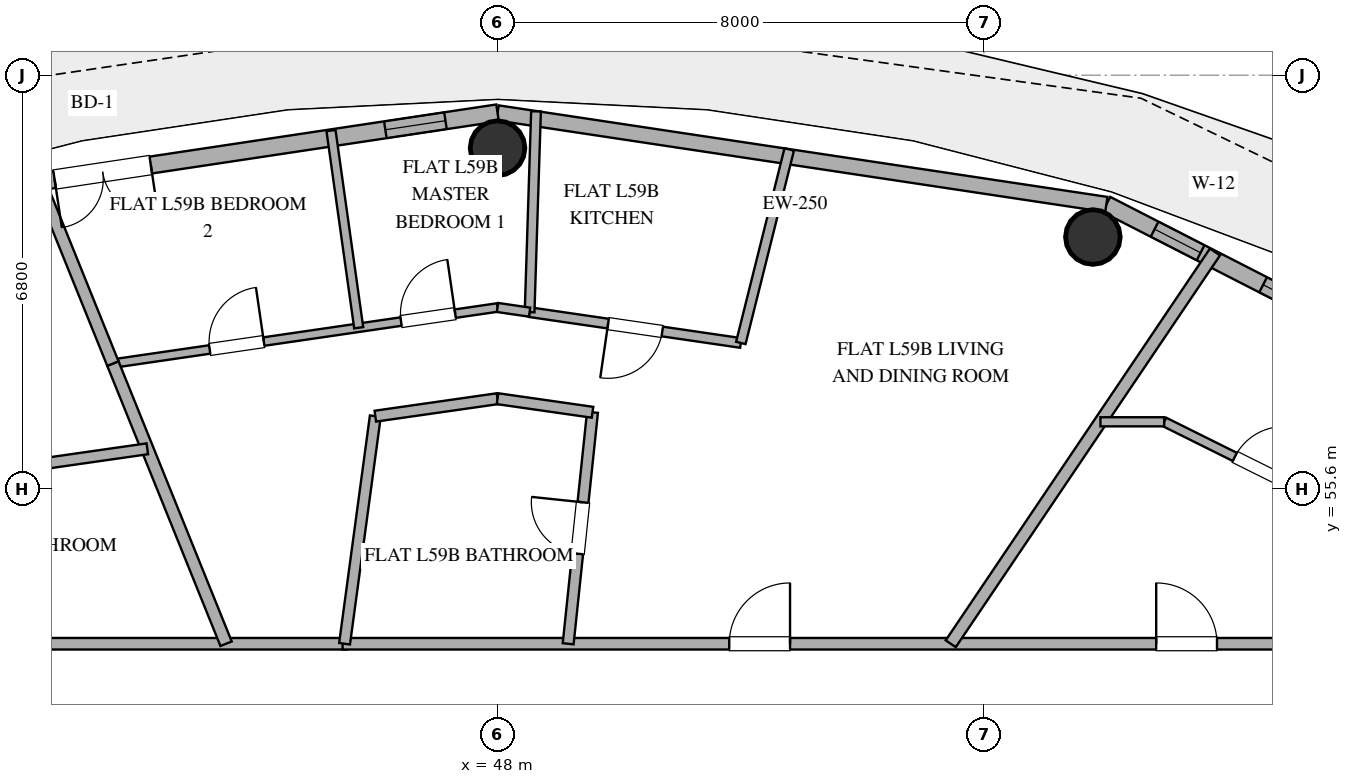
"""IFC4 building model, lengths in metres.
Left out: names, types, materials, properties, quantities, classifications, styles, units other than length and angle.
Written with IfcOpenShell. Run it as: python <this file> out.ifc"""

import sys

from ifc_helpers import new_model, si_unit, direction, frame, frame_2d, origin, origin_2d, place, context, subcontext, project, spatial, rectangle, hollow_circle, extrude, element, fill, save


model = new_model("IFC4")
c1 = context("Model", 3, precision=1e-05, world=origin(), true_north=direction((0.0, 1.0)))
c2 = subcontext(c1, "Body", "Model", "MODEL_VIEW")
j1 = project(units=[si_unit("LENGTHUNIT", "METRE"), si_unit("PLANEANGLEUNIT", "RADIAN")], contexts=[c1])
p1 = place(None, origin())
s1 = spatial("IfcSite", under=j1, at=p1, CompositionType="ELEMENT")
p2 = place(p1, origin())
s2 = spatial("IfcBuilding", under=s1, at=p2, CompositionType="ELEMENT")
p3 = place(p2, frame((0.0, 0.0, 231.6)))
s3 = spatial("IfcBuildingStorey", under=s2, at=p3, CompositionType="ELEMENT", Elevation=231.6)
for number, where, z_axis, x_axis in (
    (1, (57.791, 59.739, 0.0), (0.0, 0.0, 1.0), (1.0, 0.0, 0.0)),
    (2, (48.0, 61.2, 0.0), (0.0, 0.0, 1.0), (1.0, 0.0, 0.0)),
):
    element("IfcColumn", number, at=place(p3, frame(where, z_axis=z_axis, x_axis=x_axis)), inside=s3, PredefinedType="COLUMN", context=c2, shape_type="SweptSolid", body=[
        extrude(hollow_circle(Radius=0.45, WallThickness=0.025, at=origin_2d()), origin(), (0.0, 0.0, 1.0), 3.36),
    ])
p4 = place(p3, frame((66.383, 55.987, 0.0), z_axis=(0.0, 0.0, 1.0), x_axis=(-0.890007394051, 0.455946091699, 0.0)))
e3 = element("IfcWall", 3, at=p4, inside=s3, PredefinedType="SOLIDWALL", context=c2, shape_type="SweptSolid", body=[
    extrude(rectangle(XDim=9.404, YDim=0.28, at=frame_2d((4.702, 0.0))), origin(), (0.0, 0.0, 1.0), 3.36),
])
p5 = place(p4, frame((3.406, 0.0, 0.85)))
e4 = element("IfcOpeningElement", 4, at=p5, cuts=e3, PredefinedType="OPENING", context=c2, shape_type="SweptSolid", body=[
    extrude(rectangle(XDim=1.2, YDim=1.8, at=frame_2d((0.6, 0.9))), frame((0.0, 0.15, 0.0), z_axis=(0.0, -1.0, 0.0), x_axis=(1.0, 0.0, 0.0)), (0.0, 0.0, 1.0), 0.3),
])
p6 = place(p4, frame((5.307, 0.0, 0.85)))
e5 = element("IfcOpeningElement", 5, at=p6, cuts=e3, PredefinedType="OPENING", context=c2, shape_type="SweptSolid", body=[
    extrude(rectangle(XDim=1.2, YDim=1.8, at=frame_2d((0.6, 0.9))), frame((0.0, 0.15, 0.0), z_axis=(0.0, -1.0, 0.0), x_axis=(1.0, 0.0, 0.0)), (0.0, 0.0, 1.0), 0.3),
])
p7 = place(p4, frame((7.663, 0.0, 0.85)))
e6 = element("IfcOpeningElement", 6, at=p7, cuts=e3, PredefinedType="OPENING", context=c2, shape_type="SweptSolid", body=[
    extrude(rectangle(XDim=0.85, YDim=1.8, at=frame_2d((0.425, 0.9))), frame((0.0, 0.15, 0.0), z_axis=(0.0, -1.0, 0.0), x_axis=(1.0, 0.0, 0.0)), (0.0, 0.0, 1.0), 0.3),
])
p8 = place(p3, frame((58.013, 60.274, 0.0), z_axis=(0.0, 0.0, 1.0), x_axis=(-0.988882522213, 0.148698881169, 0.0)))
e7 = element("IfcWall", 7, at=p8, inside=s3, PredefinedType="SOLIDWALL", context=c2, shape_type="SweptSolid", body=[
    extrude(rectangle(XDim=10.125, YDim=0.25, at=frame_2d((5.062, 0.0))), origin(), (0.0, 0.0, 1.0), 3.36),
])
p9 = place(p3, frame((48.0, 61.78, 0.0), z_axis=(0.0, 0.0, 1.0), x_axis=(-0.988882522213, -0.148698881169, 0.0)))
e8 = element("IfcWall", 8, at=p9, inside=s3, PredefinedType="SOLIDWALL", context=c2, shape_type="SweptSolid", body=[
    extrude(rectangle(XDim=10.125, YDim=0.28, at=frame_2d((5.062, 0.0))), origin(), (0.0, 0.0, 1.0), 3.36),
])
p10 = place(p9, frame((5.767, 0.0, 0.0)))
e9 = element("IfcOpeningElement", 9, at=p10, cuts=e8, PredefinedType="OPENING", context=c2, shape_type="SweptSolid", body=[
    extrude(rectangle(XDim=1.6, YDim=2.25, at=frame_2d((0.8, 1.125))), frame((0.0, 0.15, 0.0), z_axis=(0.0, -1.0, 0.0), x_axis=(1.0, 0.0, 0.0)), (0.0, 0.0, 1.0), 0.3),
])
p11 = place(p9, frame((0.866, 0.0, 0.85)))
e10 = element("IfcOpeningElement", 10, at=p11, cuts=e8, PredefinedType="OPENING", context=c2, shape_type="SweptSolid", body=[
    extrude(rectangle(XDim=1.0, YDim=1.8, at=frame_2d((0.5, 0.9))), frame((0.0, 0.15, 0.0), z_axis=(0.0, -1.0, 0.0), x_axis=(1.0, 0.0, 0.0)), (0.0, 0.0, 1.0), 0.3),
])
p12 = place(p3, frame((32.75, 53.05, 0.0), z_axis=(0.0, 0.0, 1.0), x_axis=(1.0, 0.0, 0.0)))
e11 = element("IfcWall", 11, at=p12, inside=s3, PredefinedType="PARTITIONING", context=c2, shape_type="SweptSolid", body=[
    extrude(rectangle(XDim=12.766, YDim=0.19, at=frame_2d((6.383, 0.0))), origin(), (0.0, 0.0, 1.0), 2.72),
])
p13 = place(p3, frame((45.452, 53.05, 0.0), z_axis=(0.0, 0.0, 1.0), x_axis=(1.0, 0.0, 0.0)))
e12 = element("IfcWall", 12, at=p13, inside=s3, PredefinedType="PARTITIONING", context=c2, shape_type="SweptSolid", body=[
    extrude(rectangle(XDim=17.798, YDim=0.19, at=frame_2d((8.899, 0.0))), origin(), (0.0, 0.0, 1.0), 2.72),
])
p14 = place(p13, frame((13.381, 0.0, 0.0)))
e13 = element("IfcOpeningElement", 13, at=p14, cuts=e12, PredefinedType="OPENING", context=c2, shape_type="SweptSolid", body=[
    extrude(rectangle(XDim=1.0, YDim=2.2, at=frame_2d((0.5, 1.1))), frame((0.0, 0.105, 0.0), z_axis=(0.0, -1.0, 0.0), x_axis=(1.0, 0.0, 0.0)), (0.0, 0.0, 1.0), 0.21),
])
p15 = place(p13, frame((6.359, 0.0, 0.0)))
e14 = element("IfcOpeningElement", 14, at=p15, cuts=e12, PredefinedType="OPENING", context=c2, shape_type="SweptSolid", body=[
    extrude(rectangle(XDim=1.0, YDim=2.2, at=frame_2d((0.5, 1.1))), frame((0.0, 0.105, 0.0), z_axis=(0.0, -1.0, 0.0), x_axis=(1.0, 0.0, 0.0)), (0.0, 0.0, 1.0), 0.21),
])
p16 = place(p3, frame((59.799, 59.493, 0.0), z_axis=(0.0, 0.0, 1.0), x_axis=(-0.559208454265, -0.8290270832, 0.0)))
e15 = element("IfcWall", 15, at=p16, inside=s3, PredefinedType="PARTITIONING", context=c2, shape_type="SweptSolid", body=[
    extrude(rectangle(XDim=7.771, YDim=0.2, at=frame_2d((3.886, 0.0))), origin(), (0.0, 0.0, 1.0), 2.72),
])
p17 = place(p3, frame((41.674, 57.657, 0.0), z_axis=(0.0, 0.0, 1.0), x_axis=(0.989537524877, 0.144275732054, 0.0)))
e16 = element("IfcWall", 16, at=p17, inside=s3, PredefinedType="PARTITIONING", context=c2, shape_type="SweptSolid", body=[
    extrude(rectangle(XDim=6.393, YDim=0.14, at=frame_2d((3.197, 0.0))), origin(), (0.0, 0.0, 1.0), 2.72),
])
p18 = place(p17, frame((1.609, 0.0, 0.0)))
e17 = element("IfcOpeningElement", 17, at=p18, cuts=e16, PredefinedType="OPENING", context=c2, shape_type="SweptSolid", body=[
    extrude(rectangle(XDim=0.9, YDim=2.1, at=frame_2d((0.45, 1.05))), frame((0.0, 0.08, 0.0), z_axis=(0.0, -1.0, 0.0), x_axis=(1.0, 0.0, 0.0)), (0.0, 0.0, 1.0), 0.16),
])
p19 = place(p17, frame((4.789, 0.0, 0.0)))
e18 = element("IfcOpeningElement", 18, at=p19, cuts=e16, PredefinedType="OPENING", context=c2, shape_type="SweptSolid", body=[
    extrude(rectangle(XDim=0.9, YDim=2.1, at=frame_2d((0.45, 1.05))), frame((0.0, 0.08, 0.0), z_axis=(0.0, -1.0, 0.0), x_axis=(1.0, 0.0, 0.0)), (0.0, 0.0, 1.0), 0.16),
])
p20 = place(p3, frame((49.161, 53.05, 0.0), z_axis=(0.0, 0.0, 1.0), x_axis=(0.10454201208, 0.994520471237, 0.0)))
e19 = element("IfcWall", 19, at=p20, inside=s3, PredefinedType="PLUMBINGWALL", context=c2, shape_type="SweptSolid", body=[
    extrude(rectangle(XDim=3.828, YDim=0.18, at=frame_2d((1.914, 0.0))), origin(), (0.0, 0.0, 1.0), 2.72),
])
p21 = place(p20, frame((1.489, 0.0, 0.0)))
e20 = element("IfcOpeningElement", 20, at=p21, cuts=e19, PredefinedType="OPENING", context=c2, shape_type="SweptSolid", body=[
    extrude(rectangle(XDim=0.85, YDim=2.1, at=frame_2d((0.425, 1.05))), frame((0.0, 0.1, 0.0), z_axis=(0.0, -1.0, 0.0), x_axis=(1.0, 0.0, 0.0)), (0.0, 0.0, 1.0), 0.2),
])
p22 = place(p3, frame((45.99, 56.792, 0.0), z_axis=(0.0, 0.0, 1.0), x_axis=(-0.134013985284, -0.990979440628, 0.0)))
e21 = element("IfcWall", 21, at=p22, inside=s3, PredefinedType="PLUMBINGWALL", context=c2, shape_type="SweptSolid", body=[
    extrude(rectangle(XDim=3.777, YDim=0.18, at=frame_2d((1.888, 0.0))), origin(), (0.0, 0.0, 1.0), 2.72),
])
p23 = place(p3, frame((52.001, 57.997, 0.0), z_axis=(0.0, 0.0, 1.0), x_axis=(-0.989533601714, 0.144302637118, 0.0)))
e22 = element("IfcWall", 22, at=p23, inside=s3, PredefinedType="PLUMBINGWALL", context=c2, shape_type="SweptSolid", body=[
    extrude(rectangle(XDim=3.511, YDim=0.16, at=frame_2d((1.755, 0.0))), origin(), (0.0, 0.0, 1.0), 2.72),
])
p24 = place(p23, frame((1.305, 0.0, 0.0)))
e23 = element("IfcOpeningElement", 23, at=p24, cuts=e22, PredefinedType="OPENING", context=c2, shape_type="SweptSolid", body=[
    extrude(rectangle(XDim=0.9, YDim=2.1, at=frame_2d((0.45, 1.05))), frame((0.0, 0.09, 0.0), z_axis=(0.0, -1.0, 0.0), x_axis=(1.0, 0.0, 0.0)), (0.0, 0.0, 1.0), 0.18),
])
p25 = place(p3, frame((58.964, 56.7, 0.0), z_axis=(0.0, 0.0, 1.0), x_axis=(0.895471406875, -0.445119039661, 0.0)))
e24 = element("IfcWall", 24, at=p25, inside=s3, PredefinedType="PARTITIONING", context=c2, shape_type="SweptSolid", body=[
    extrude(rectangle(XDim=5.971, YDim=0.15, at=frame_2d((2.986, 0.0))), origin(), (0.0, 0.0, 1.0), 2.72),
])
p26 = place(p25, frame((1.297, 0.0, 0.0)))
e25 = element("IfcOpeningElement", 25, at=p26, cuts=e24, PredefinedType="OPENING", context=c2, shape_type="SweptSolid", body=[
    extrude(rectangle(XDim=0.9, YDim=2.1, at=frame_2d((0.45, 1.05))), frame((0.0, 0.085, 0.0), z_axis=(0.0, -1.0, 0.0), x_axis=(1.0, 0.0, 0.0)), (0.0, 0.0, 1.0), 0.17),
])
p27 = place(p25, frame((4.266, 0.0, 0.0)))
e26 = element("IfcOpeningElement", 26, at=p27, cuts=e24, PredefinedType="OPENING", context=c2, shape_type="SweptSolid", body=[
    extrude(rectangle(XDim=0.9, YDim=2.1, at=frame_2d((0.45, 1.05))), frame((0.0, 0.085, 0.0), z_axis=(0.0, -1.0, 0.0), x_axis=(1.0, 0.0, 0.0)), (0.0, 0.0, 1.0), 0.17),
])
p28 = place(p3, frame((41.674, 57.657, 0.0), z_axis=(0.0, 0.0, 1.0), x_axis=(0.374573524941, -0.927197214412, 0.0)))
e27 = element("IfcWall", 27, at=p28, inside=s3, PredefinedType="PARTITIONING", context=c2, shape_type="SweptSolid", body=[
    extrude(rectangle(XDim=4.969, YDim=0.2, at=frame_2d((2.485, 0.0))), origin(), (0.0, 0.0, 1.0), 2.72),
])
p29 = place(p3, frame((41.674, 57.657, 0.0), z_axis=(0.0, 0.0, 1.0), x_axis=(-0.374572886439, 0.927197472357, 0.0)))
e28 = element("IfcWall", 28, at=p29, inside=s3, PredefinedType="PARTITIONING", context=c2, shape_type="SweptSolid", body=[
    extrude(rectangle(XDim=3.344, YDim=0.2, at=frame_2d((1.672, 0.0))), origin(), (0.0, 0.0, 1.0), 2.72),
])
p30 = place(p3, frame((48.633, 61.805, 0.0), z_axis=(0.0, 0.0, 1.0), x_axis=(-0.031996030035, -0.999487995957, 0.0)))
e29 = element("IfcWall", 29, at=p30, inside=s3, PredefinedType="PLUMBINGWALL", context=c2, shape_type="SweptSolid", body=[
    extrude(rectangle(XDim=3.304, YDim=0.16, at=frame_2d((1.652, 0.0))), origin(), (0.0, 0.0, 1.0), 2.72),
])
p31 = place(p3, frame((52.797, 61.179, 0.0), z_axis=(0.0, 0.0, 1.0), x_axis=(-0.242658184372, -0.970111852086, 0.0)))
e30 = element("IfcWall", 30, at=p31, inside=s3, PredefinedType="PLUMBINGWALL", context=c2, shape_type="SweptSolid", body=[
    extrude(rectangle(XDim=3.281, YDim=0.16, at=frame_2d((1.641, 0.0))), origin(), (0.0, 0.0, 1.0), 2.72),
])
p32 = place(p3, frame((45.717, 58.247, 0.0), z_axis=(0.0, 0.0, 1.0), x_axis=(-0.139134872395, 0.990273440664, 0.0)))
e31 = element("IfcWall", 31, at=p32, inside=s3, PredefinedType="PARTITIONING", context=c2, shape_type="SweptSolid", body=[
    extrude(rectangle(XDim=3.274, YDim=0.15, at=frame_2d((1.637, 0.0))), origin(), (0.0, 0.0, 1.0), 2.72),
])
p33 = place(p3, frame((39.976, 55.932, 0.0), z_axis=(0.0, 0.0, 1.0), x_axis=(0.989917445937, 0.141645509032, 0.0)))
e32 = element("IfcWall", 32, at=p33, inside=s3, PredefinedType="PLUMBINGWALL", context=c2, shape_type="SweptSolid", body=[
    extrude(rectangle(XDim=2.287, YDim=0.18, at=frame_2d((1.144, 0.0))), origin(), (0.0, 0.0, 1.0), 2.72),
])
p34 = place(p3, frame((48.0, 57.08, 0.0), z_axis=(0.0, 0.0, 1.0), x_axis=(-0.989918207634, -0.141640185666, 0.0)))
e33 = element("IfcWall", 33, at=p34, inside=s3, PredefinedType="PLUMBINGWALL", context=c2, shape_type="SweptSolid", body=[
    extrude(rectangle(XDim=2.031, YDim=0.18, at=frame_2d((1.015, 0.0))), origin(), (0.0, 0.0, 1.0), 2.72),
])
p35 = place(p3, frame((49.562, 56.857, 0.0), z_axis=(0.0, 0.0, 1.0), x_axis=(-0.989921615496, 0.141616366194, 0.0)))
e34 = element("IfcWall", 34, at=p35, inside=s3, PredefinedType="PLUMBINGWALL", context=c2, shape_type="SweptSolid", body=[
    extrude(rectangle(XDim=1.577, YDim=0.18, at=frame_2d((0.789, 0.0))), origin(), (0.0, 0.0, 1.0), 2.72),
])
p36 = place(p3, frame((57.915, 56.7, 0.0), z_axis=(0.0, 0.0, 1.0), x_axis=(1.0, 0.0, 0.0)))
e35 = element("IfcWall", 35, at=p36, inside=s3, PredefinedType="PARTITIONING", context=c2, shape_type="SweptSolid", body=[
    extrude(rectangle(XDim=1.049, YDim=0.15, at=frame_2d((0.524, 0.0))), origin(), (0.0, 0.0, 1.0), 2.72),
])
p37 = place(p3, frame((48.527, 58.503, 0.0), z_axis=(0.0, 0.0, 1.0), x_axis=(-0.989523434522, 0.144372339914, 0.0)))
e36 = element("IfcWall", 36, at=p37, inside=s3, PredefinedType="PARTITIONING", context=c2, shape_type="SweptSolid", body=[
    extrude(rectangle(XDim=0.533, YDim=0.15, at=frame_2d((0.266, 0.0))), origin(), (0.0, 0.0, 1.0), 2.72),
])
p38 = place(p6, origin())
e37 = element("IfcWindow", 37, at=p38, inside=s3, PartitioningType="SINGLE_PANEL", PredefinedType="WINDOW", context=c2, shape_type="SweptSolid", body=[
    extrude(rectangle(XDim=1.2, YDim=1.8, at=frame_2d((0.6, 0.9))), frame((0.0, 0.03, 0.0), z_axis=(0.0, -1.0, 0.0), x_axis=(1.0, 0.0, 0.0)), (0.0, 0.0, 1.0), 0.06),
])
fill(e5, e37)
p39 = place(p10, origin())
e38 = element("IfcDoor", 38, at=p39, inside=s3, OperationType="DOUBLE_DOOR_SINGLE_SWING", PredefinedType="DOOR", context=c2, shape_type="SweptSolid", body=[
    extrude(rectangle(XDim=1.6, YDim=2.25, at=frame_2d((0.8, 1.125))), frame((0.0, 0.025, 0.0), z_axis=(0.0, -1.0, 0.0), x_axis=(1.0, 0.0, 0.0)), (0.0, 0.0, 1.0), 0.05),
])
fill(e9, e38)
p40 = place(p7, origin())
e39 = element("IfcWindow", 39, at=p40, inside=s3, PartitioningType="SINGLE_PANEL", PredefinedType="WINDOW", context=c2, shape_type="SweptSolid", body=[
    extrude(rectangle(XDim=0.85, YDim=1.8, at=frame_2d((0.425, 0.9))), frame((0.0, 0.03, 0.0), z_axis=(0.0, -1.0, 0.0), x_axis=(1.0, 0.0, 0.0)), (0.0, 0.0, 1.0), 0.06),
])
fill(e6, e39)
p41 = place(p11, origin())
e40 = element("IfcWindow", 40, at=p41, inside=s3, PartitioningType="SINGLE_PANEL", PredefinedType="WINDOW", context=c2, shape_type="SweptSolid", body=[
    extrude(rectangle(XDim=1.0, YDim=1.8, at=frame_2d((0.5, 0.9))), frame((0.0, 0.03, 0.0), z_axis=(0.0, -1.0, 0.0), x_axis=(1.0, 0.0, 0.0)), (0.0, 0.0, 1.0), 0.06),
])
fill(e10, e40)
p42 = place(p14, origin())
e41 = element("IfcDoor", 41, at=p42, inside=s3, OperationType="SINGLE_SWING_LEFT", PredefinedType="DOOR", context=c2, shape_type="SweptSolid", body=[
    extrude(rectangle(XDim=1.0, YDim=2.2, at=frame_2d((0.5, 1.1))), frame((0.0, 0.025, 0.0), z_axis=(0.0, -1.0, 0.0), x_axis=(1.0, 0.0, 0.0)), (0.0, 0.0, 1.0), 0.05),
])
fill(e13, e41)
p43 = place(p15, origin())
e42 = element("IfcDoor", 42, at=p43, inside=s3, OperationType="SINGLE_SWING_RIGHT", PredefinedType="DOOR", context=c2, shape_type="SweptSolid", body=[
    extrude(rectangle(XDim=1.0, YDim=2.2, at=frame_2d((0.5, 1.1))), frame((0.0, 0.025, 0.0), z_axis=(0.0, -1.0, 0.0), x_axis=(1.0, 0.0, 0.0)), (0.0, 0.0, 1.0), 0.05),
])
fill(e14, e42)
p44 = place(p18, origin())
e43 = element("IfcDoor", 43, at=p44, inside=s3, OperationType="SINGLE_SWING_RIGHT", PredefinedType="DOOR", context=c2, shape_type="SweptSolid", body=[
    extrude(rectangle(XDim=0.9, YDim=2.1, at=frame_2d((0.45, 1.05))), frame((0.0, 0.025, 0.0), z_axis=(0.0, -1.0, 0.0), x_axis=(1.0, 0.0, 0.0)), (0.0, 0.0, 1.0), 0.05),
])
fill(e17, e43)
p45 = place(p19, origin())
e44 = element("IfcDoor", 44, at=p45, inside=s3, OperationType="SINGLE_SWING_RIGHT", PredefinedType="DOOR", context=c2, shape_type="SweptSolid", body=[
    extrude(rectangle(XDim=0.9, YDim=2.1, at=frame_2d((0.45, 1.05))), frame((0.0, 0.025, 0.0), z_axis=(0.0, -1.0, 0.0), x_axis=(1.0, 0.0, 0.0)), (0.0, 0.0, 1.0), 0.05),
])
fill(e18, e44)
p46 = place(p21, origin())
e45 = element("IfcDoor", 45, at=p46, inside=s3, OperationType="SINGLE_SWING_RIGHT", PredefinedType="DOOR", context=c2, shape_type="SweptSolid", body=[
    extrude(rectangle(XDim=0.85, YDim=2.1, at=frame_2d((0.425, 1.05))), frame((0.0, 0.025, 0.0), z_axis=(0.0, -1.0, 0.0), x_axis=(1.0, 0.0, 0.0)), (0.0, 0.0, 1.0), 0.05),
])
fill(e20, e45)
p47 = place(p24, origin())
e46 = element("IfcDoor", 46, at=p47, inside=s3, OperationType="SINGLE_SWING_RIGHT", PredefinedType="DOOR", context=c2, shape_type="SweptSolid", body=[
    extrude(rectangle(XDim=0.9, YDim=2.1, at=frame_2d((0.45, 1.05))), frame((0.0, 0.025, 0.0), z_axis=(0.0, -1.0, 0.0), x_axis=(1.0, 0.0, 0.0)), (0.0, 0.0, 1.0), 0.05),
])
fill(e23, e46)
p48 = place(p26, origin())
e47 = element("IfcDoor", 47, at=p48, inside=s3, OperationType="SINGLE_SWING_RIGHT", PredefinedType="DOOR", context=c2, shape_type="SweptSolid", body=[
    extrude(rectangle(XDim=0.9, YDim=2.1, at=frame_2d((0.45, 1.05))), frame((0.0, 0.025, 0.0), z_axis=(0.0, -1.0, 0.0), x_axis=(1.0, 0.0, 0.0)), (0.0, 0.0, 1.0), 0.05),
])
fill(e25, e47)
save(model, sys.argv[1])
